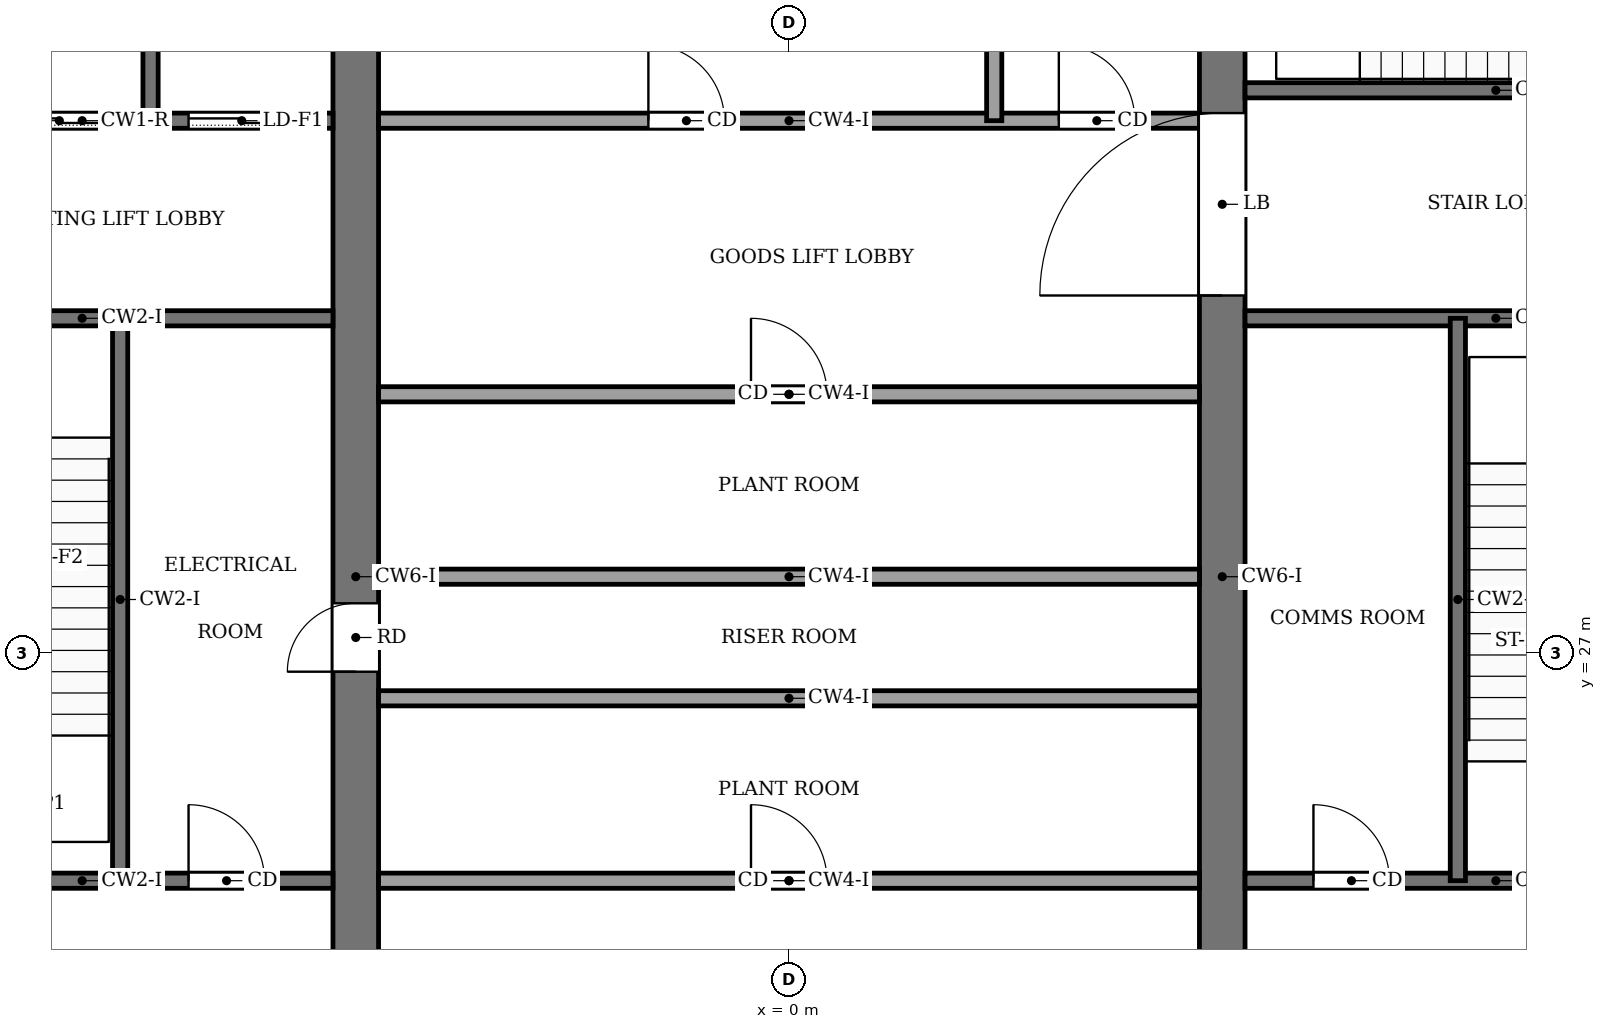
"""IFC4 building model, lengths in metres.
Left out: names, types, materials, properties, quantities, classifications, styles, units other than length and angle.
Written with IfcOpenShell. Run it as: python <this file> out.ifc"""

import sys

from ifc_helpers import new_model, si_unit, direction, frame, frame_2d, origin, place, context, subcontext, project, spatial, rectangle, extrude, element, fill, save


model = new_model("IFC4")
c1 = context("Model", 3, precision=1e-05, world=origin(), true_north=direction((0.0, 1.0)))
c2 = subcontext(c1, "Body", "Model", "MODEL_VIEW")
j1 = project(units=[si_unit("LENGTHUNIT", "METRE"), si_unit("PLANEANGLEUNIT", "RADIAN")], contexts=[c1])
p1 = place(None, origin())
s1 = spatial("IfcSite", under=j1, at=p1, CompositionType="ELEMENT")
p2 = place(p1, origin())
s2 = spatial("IfcBuilding", under=s1, at=p2, CompositionType="ELEMENT")
p3 = place(p2, frame((0.0, 0.0, 349.5)))
s3 = spatial("IfcBuildingStorey", under=s2, at=p3, CompositionType="ELEMENT", Elevation=349.5)
p4 = place(p3, frame((-5.7, 18.4, -0.15), z_axis=(0.0, 0.0, 1.0), x_axis=(0.0, 1.0, 0.0)))
e1 = element("IfcWall", 1, at=p4, inside=s3, PredefinedType="SHEAR", context=c2, shape_type="SweptSolid", body=[
    extrude(rectangle(XDim=19.2, YDim=0.6, at=frame_2d((9.6, 0.0))), origin(), (0.0, 0.0, 1.0), 5.0),
])
p5 = place(p4, frame((8.35, 0.0, 0.15)))
e2 = element("IfcOpeningElement", 2, at=p5, cuts=e1, PredefinedType="OPENING", context=c2, shape_type="SweptSolid", body=[
    extrude(rectangle(XDim=0.9, YDim=2.1, at=frame_2d((0.45, 1.05))), frame((0.0, 0.31, 0.0), z_axis=(0.0, -1.0, 0.0), x_axis=(1.0, 0.0, 0.0)), (0.0, 0.0, 1.0), 0.62),
])
p6 = place(p3, frame((5.7, 18.4, -0.15), z_axis=(0.0, 0.0, 1.0), x_axis=(0.0, 1.0, 0.0)))
e3 = element("IfcWall", 3, at=p6, inside=s3, PredefinedType="SHEAR", context=c2, shape_type="SweptSolid", body=[
    extrude(rectangle(XDim=19.2, YDim=0.6, at=frame_2d((9.6, 0.0))), origin(), (0.0, 0.0, 1.0), 5.0),
])
p7 = place(p6, frame((13.3, 0.0, 0.15)))
e4 = element("IfcOpeningElement", 4, at=p7, cuts=e3, PredefinedType="OPENING", context=c2, shape_type="SweptSolid", body=[
    extrude(rectangle(XDim=2.4, YDim=2.4, at=frame_2d((1.2, 1.2))), frame((0.0, 0.31, 0.0), z_axis=(0.0, -1.0, 0.0), x_axis=(1.0, 0.0, 0.0)), (0.0, 0.0, 1.0), 0.62),
])
p8 = place(p3, frame((-12.6, 24.0, 0.0), z_axis=(0.0, 0.0, 1.0), x_axis=(1.0, 0.0, 0.0)))
e5 = element("IfcWall", 5, at=p8, inside=s3, PredefinedType="PARTITIONING", context=c2, shape_type="SweptSolid", body=[
    extrude(rectangle(XDim=6.6, YDim=0.2, at=frame_2d((3.3, 0.0))), origin(), (0.0, 0.0, 1.0), 4.85),
])
p9 = place(p8, frame((4.7, 0.0, 0.0)))
e6 = element("IfcOpeningElement", 6, at=p9, cuts=e5, PredefinedType="OPENING", context=c2, shape_type="SweptSolid", body=[
    extrude(rectangle(XDim=1.0, YDim=2.1, at=frame_2d((0.5, 1.05))), frame((0.0, 0.11, 0.0), z_axis=(0.0, -1.0, 0.0), x_axis=(1.0, 0.0, 0.0)), (0.0, 0.0, 1.0), 0.22),
])
p10 = place(p3, frame((-5.4, 24.0, 0.0), z_axis=(0.0, 0.0, 1.0), x_axis=(1.0, 0.0, 0.0)))
e7 = element("IfcWall", 7, at=p10, inside=s3, PredefinedType="PARTITIONING", context=c2, shape_type="SweptSolid", body=[
    extrude(rectangle(XDim=10.8, YDim=0.2, at=frame_2d((5.4, 0.0))), origin(), (0.0, 0.0, 1.0), 4.85),
])
p11 = place(p10, frame((4.9, 0.0, 0.0)))
e8 = element("IfcOpeningElement", 8, at=p11, cuts=e7, PredefinedType="OPENING", context=c2, shape_type="SweptSolid", body=[
    extrude(rectangle(XDim=1.0, YDim=2.1, at=frame_2d((0.5, 1.05))), frame((0.0, 0.11, 0.0), z_axis=(0.0, -1.0, 0.0), x_axis=(1.0, 0.0, 0.0)), (0.0, 0.0, 1.0), 0.22),
])
p12 = place(p3, frame((6.0, 24.0, 0.0), z_axis=(0.0, 0.0, 1.0), x_axis=(1.0, 0.0, 0.0)))
e9 = element("IfcWall", 9, at=p12, inside=s3, PredefinedType="PARTITIONING", context=c2, shape_type="SweptSolid", body=[
    extrude(rectangle(XDim=6.6, YDim=0.2, at=frame_2d((3.3, 0.0))), origin(), (0.0, 0.0, 1.0), 4.85),
])
p13 = place(p12, frame((0.9, 0.0, 0.0)))
e10 = element("IfcOpeningElement", 10, at=p13, cuts=e9, PredefinedType="OPENING", context=c2, shape_type="SweptSolid", body=[
    extrude(rectangle(XDim=1.0, YDim=2.1, at=frame_2d((0.5, 1.05))), frame((0.0, 0.11, 0.0), z_axis=(0.0, -1.0, 0.0), x_axis=(1.0, 0.0, 0.0)), (0.0, 0.0, 1.0), 0.22),
])
p14 = place(p12, frame((4.4, 0.0, 0.0)))
e11 = element("IfcOpeningElement", 11, at=p14, cuts=e9, PredefinedType="OPENING", context=c2, shape_type="SweptSolid", body=[
    extrude(rectangle(XDim=1.2, YDim=2.2, at=frame_2d((0.6, 1.1))), frame((0.0, 0.11, 0.0), z_axis=(0.0, -1.0, 0.0), x_axis=(1.0, 0.0, 0.0)), (0.0, 0.0, 1.0), 0.22),
])
for number, where, z_axis, x_axis in (
    (12, (-5.4, 26.4, 0.0), (0.0, 0.0, 1.0), (1.0, 0.0, 0.0)),
    (13, (-5.4, 28.0, 0.0), (0.0, 0.0, 1.0), (1.0, 0.0, 0.0)),
):
    element("IfcWall", number, at=place(p3, frame(where, z_axis=z_axis, x_axis=x_axis)), inside=s3, PredefinedType="PARTITIONING", context=c2, shape_type="SweptSolid", body=[
        extrude(rectangle(XDim=10.8, YDim=0.2, at=frame_2d((5.4, 0.0))), origin(), (0.0, 0.0, 1.0), 4.85),
    ])
p15 = place(p3, frame((-5.4, 30.4, 0.0), z_axis=(0.0, 0.0, 1.0), x_axis=(1.0, 0.0, 0.0)))
e14 = element("IfcWall", 14, at=p15, inside=s3, PredefinedType="PARTITIONING", context=c2, shape_type="SweptSolid", body=[
    extrude(rectangle(XDim=10.8, YDim=0.2, at=frame_2d((5.4, 0.0))), origin(), (0.0, 0.0, 1.0), 4.85),
])
p16 = place(p15, frame((4.9, 0.0, 0.0)))
e15 = element("IfcOpeningElement", 15, at=p16, cuts=e14, PredefinedType="OPENING", context=c2, shape_type="SweptSolid", body=[
    extrude(rectangle(XDim=1.0, YDim=2.1, at=frame_2d((0.5, 1.05))), frame((0.0, 0.11, 0.0), z_axis=(0.0, -1.0, 0.0), x_axis=(1.0, 0.0, 0.0)), (0.0, 0.0, 1.0), 0.22),
])
p17 = place(p3, frame((-12.6, 31.4, 0.0), z_axis=(0.0, 0.0, 1.0), x_axis=(1.0, 0.0, 0.0)))
e16 = element("IfcWall", 16, at=p17, inside=s3, PredefinedType="PARTITIONING", context=c2, shape_type="SweptSolid", body=[
    extrude(rectangle(XDim=6.6, YDim=0.2, at=frame_2d((3.3, 0.0))), origin(), (0.0, 0.0, 1.0), 4.85),
])
p18 = place(p17, frame((1.0, 0.0, 0.0)))
e17 = element("IfcOpeningElement", 17, at=p18, cuts=e16, PredefinedType="OPENING", context=c2, shape_type="SweptSolid", body=[
    extrude(rectangle(XDim=1.2, YDim=2.2, at=frame_2d((0.6, 1.1))), frame((0.0, 0.11, 0.0), z_axis=(0.0, -1.0, 0.0), x_axis=(1.0, 0.0, 0.0)), (0.0, 0.0, 1.0), 0.22),
])
p19 = place(p3, frame((6.0, 31.4, 0.0), z_axis=(0.0, 0.0, 1.0), x_axis=(1.0, 0.0, 0.0)))
e18 = element("IfcWall", 18, at=p19, inside=s3, PredefinedType="PARTITIONING", context=c2, shape_type="SweptSolid", body=[
    extrude(rectangle(XDim=6.6, YDim=0.2, at=frame_2d((3.3, 0.0))), origin(), (0.0, 0.0, 1.0), 4.85),
])
p20 = place(p3, frame((-12.6, 34.0, 0.0), z_axis=(0.0, 0.0, 1.0), x_axis=(1.0, 0.0, 0.0)))
e19 = element("IfcWall", 19, at=p20, inside=s3, PredefinedType="PARTITIONING", context=c2, shape_type="SweptSolid", body=[
    extrude(rectangle(XDim=6.6, YDim=0.2, at=frame_2d((3.3, 0.0))), origin(), (0.0, 0.0, 1.0), 4.85),
])
p21 = place(p20, frame((4.7, 0.0, 0.0)))
e20 = element("IfcOpeningElement", 20, at=p21, cuts=e19, PredefinedType="OPENING", context=c2, shape_type="SweptSolid", body=[
    extrude(rectangle(XDim=1.4, YDim=2.2, at=frame_2d((0.7, 1.1))), frame((0.0, 0.11, 0.0), z_axis=(0.0, -1.0, 0.0), x_axis=(1.0, 0.0, 0.0)), (0.0, 0.0, 1.0), 0.22),
])
p22 = place(p20, frame((2.3, 0.0, 0.0)))
e21 = element("IfcOpeningElement", 21, at=p22, cuts=e19, PredefinedType="OPENING", context=c2, shape_type="SweptSolid", body=[
    extrude(rectangle(XDim=1.4, YDim=2.2, at=frame_2d((0.7, 1.1))), frame((0.0, 0.11, 0.0), z_axis=(0.0, -1.0, 0.0), x_axis=(1.0, 0.0, 0.0)), (0.0, 0.0, 1.0), 0.22),
])
p23 = place(p20, frame((0.45, 0.0, 0.0)))
e22 = element("IfcOpeningElement", 22, at=p23, cuts=e19, PredefinedType="OPENING", context=c2, shape_type="SweptSolid", body=[
    extrude(rectangle(XDim=0.9, YDim=2.1, at=frame_2d((0.45, 1.05))), frame((0.0, 0.11, 0.0), z_axis=(0.0, -1.0, 0.0), x_axis=(1.0, 0.0, 0.0)), (0.0, 0.0, 1.0), 0.22),
])
p24 = place(p3, frame((-5.4, 34.0, 0.0), z_axis=(0.0, 0.0, 1.0), x_axis=(1.0, 0.0, 0.0)))
e23 = element("IfcWall", 23, at=p24, inside=s3, PredefinedType="PARTITIONING", context=c2, shape_type="SweptSolid", body=[
    extrude(rectangle(XDim=10.8, YDim=0.2, at=frame_2d((5.4, 0.0))), origin(), (0.0, 0.0, 1.0), 4.85),
])
p25 = place(p24, frame((3.55, 0.0, 0.0)))
e24 = element("IfcOpeningElement", 24, at=p25, cuts=e23, PredefinedType="OPENING", context=c2, shape_type="SweptSolid", body=[
    extrude(rectangle(XDim=1.0, YDim=2.1, at=frame_2d((0.5, 1.05))), frame((0.0, 0.11, 0.0), z_axis=(0.0, -1.0, 0.0), x_axis=(1.0, 0.0, 0.0)), (0.0, 0.0, 1.0), 0.22),
])
p26 = place(p24, frame((8.95, 0.0, 0.0)))
e25 = element("IfcOpeningElement", 25, at=p26, cuts=e23, PredefinedType="OPENING", context=c2, shape_type="SweptSolid", body=[
    extrude(rectangle(XDim=1.0, YDim=2.1, at=frame_2d((0.5, 1.05))), frame((0.0, 0.11, 0.0), z_axis=(0.0, -1.0, 0.0), x_axis=(1.0, 0.0, 0.0)), (0.0, 0.0, 1.0), 0.22),
])
p27 = place(p3, frame((6.0, 34.4, 0.0), z_axis=(0.0, 0.0, 1.0), x_axis=(1.0, 0.0, 0.0)))
e26 = element("IfcWall", 26, at=p27, inside=s3, PredefinedType="PARTITIONING", context=c2, shape_type="SweptSolid", body=[
    extrude(rectangle(XDim=6.6, YDim=0.2, at=frame_2d((3.3, 0.0))), origin(), (0.0, 0.0, 1.0), 4.85),
])
p28 = place(p27, frame((4.8, 0.0, 0.0)))
e27 = element("IfcOpeningElement", 27, at=p28, cuts=e26, PredefinedType="OPENING", context=c2, shape_type="SweptSolid", body=[
    extrude(rectangle(XDim=1.2, YDim=2.2, at=frame_2d((0.6, 1.1))), frame((0.0, 0.11, 0.0), z_axis=(0.0, -1.0, 0.0), x_axis=(1.0, 0.0, 0.0)), (0.0, 0.0, 1.0), 0.22),
])
p29 = place(p3, frame((-8.8, 24.0, 0.0), z_axis=(0.0, 0.0, 1.0), x_axis=(0.0, 1.0, 0.0)))
e28 = element("IfcWall", 28, at=p29, inside=s3, PredefinedType="PARTITIONING", context=c2, shape_type="SweptSolid", body=[
    extrude(rectangle(XDim=7.4, YDim=0.2, at=frame_2d((3.7, 0.0))), origin(), (0.0, 0.0, 1.0), 4.85),
])
for number, where, z_axis, x_axis in (
    (29, (-8.4, 34.0, 0.0), (0.0, 0.0, 1.0), (0.0, 1.0, 0.0)),
    (30, (2.7, 34.0, 0.0), (0.0, 0.0, 1.0), (0.0, 1.0, 0.0)),
):
    element("IfcWall", number, at=place(p3, frame(where, z_axis=z_axis, x_axis=x_axis)), inside=s3, PredefinedType="PARTITIONING", context=c2, shape_type="SweptSolid", body=[
        extrude(rectangle(XDim=3.6, YDim=0.2, at=frame_2d((1.8, 0.0))), origin(), (0.0, 0.0, 1.0), 4.85),
    ])
p30 = place(p3, frame((8.8, 24.0, 0.0), z_axis=(0.0, 0.0, 1.0), x_axis=(0.0, 1.0, 0.0)))
e31 = element("IfcWall", 31, at=p30, inside=s3, PredefinedType="PARTITIONING", context=c2, shape_type="SweptSolid", body=[
    extrude(rectangle(XDim=7.4, YDim=0.2, at=frame_2d((3.7, 0.0))), origin(), (0.0, 0.0, 1.0), 4.85),
])
p31 = place(p21, origin())
e32 = element("IfcDoor", 32, at=p31, inside=s3, OperationType="SLIDING_TO_LEFT", PredefinedType="DOOR", context=c2, shape_type="SweptSolid", body=[
    extrude(rectangle(XDim=1.4, YDim=2.2, at=frame_2d((0.7, 1.1))), frame((0.0, 0.025, 0.0), z_axis=(0.0, -1.0, 0.0), x_axis=(1.0, 0.0, 0.0)), (0.0, 0.0, 1.0), 0.05),
])
fill(e20, e32)
p32 = place(p22, origin())
e33 = element("IfcDoor", 33, at=p32, inside=s3, OperationType="SLIDING_TO_LEFT", PredefinedType="DOOR", context=c2, shape_type="SweptSolid", body=[
    extrude(rectangle(XDim=1.4, YDim=2.2, at=frame_2d((0.7, 1.1))), frame((0.0, 0.025, 0.0), z_axis=(0.0, -1.0, 0.0), x_axis=(1.0, 0.0, 0.0)), (0.0, 0.0, 1.0), 0.05),
])
fill(e21, e33)
p33 = place(p11, origin())
e34 = element("IfcDoor", 34, at=p33, inside=s3, OperationType="SINGLE_SWING_RIGHT", PredefinedType="DOOR", context=c2, shape_type="SweptSolid", body=[
    extrude(rectangle(XDim=1.0, YDim=2.1, at=frame_2d((0.5, 1.05))), frame((0.0, 0.025, 0.0), z_axis=(0.0, -1.0, 0.0), x_axis=(1.0, 0.0, 0.0)), (0.0, 0.0, 1.0), 0.05),
])
fill(e8, e34)
p34 = place(p16, origin())
e35 = element("IfcDoor", 35, at=p34, inside=s3, OperationType="SINGLE_SWING_LEFT", PredefinedType="DOOR", context=c2, shape_type="SweptSolid", body=[
    extrude(rectangle(XDim=1.0, YDim=2.1, at=frame_2d((0.5, 1.05))), frame((0.0, 0.025, 0.0), z_axis=(0.0, -1.0, 0.0), x_axis=(1.0, 0.0, 0.0)), (0.0, 0.0, 1.0), 0.05),
])
fill(e15, e35)
p35 = place(p25, origin())
e36 = element("IfcDoor", 36, at=p35, inside=s3, OperationType="SINGLE_SWING_LEFT", PredefinedType="DOOR", context=c2, shape_type="SweptSolid", body=[
    extrude(rectangle(XDim=1.0, YDim=2.1, at=frame_2d((0.5, 1.05))), frame((0.0, 0.025, 0.0), z_axis=(0.0, -1.0, 0.0), x_axis=(1.0, 0.0, 0.0)), (0.0, 0.0, 1.0), 0.05),
])
fill(e24, e36)
p36 = place(p9, origin())
e37 = element("IfcDoor", 37, at=p36, inside=s3, OperationType="SINGLE_SWING_LEFT", PredefinedType="DOOR", context=c2, shape_type="SweptSolid", body=[
    extrude(rectangle(XDim=1.0, YDim=2.1, at=frame_2d((0.5, 1.05))), frame((0.0, 0.025, 0.0), z_axis=(0.0, -1.0, 0.0), x_axis=(1.0, 0.0, 0.0)), (0.0, 0.0, 1.0), 0.05),
])
fill(e6, e37)
p37 = place(p13, origin())
e38 = element("IfcDoor", 38, at=p37, inside=s3, OperationType="SINGLE_SWING_RIGHT", PredefinedType="DOOR", context=c2, shape_type="SweptSolid", body=[
    extrude(rectangle(XDim=1.0, YDim=2.1, at=frame_2d((0.5, 1.05))), frame((0.0, 0.025, 0.0), z_axis=(0.0, -1.0, 0.0), x_axis=(1.0, 0.0, 0.0)), (0.0, 0.0, 1.0), 0.05),
])
fill(e10, e38)
p38 = place(p26, origin())
e39 = element("IfcDoor", 39, at=p38, inside=s3, OperationType="SINGLE_SWING_LEFT", PredefinedType="DOOR", context=c2, shape_type="SweptSolid", body=[
    extrude(rectangle(XDim=1.0, YDim=2.1, at=frame_2d((0.5, 1.05))), frame((0.0, 0.025, 0.0), z_axis=(0.0, -1.0, 0.0), x_axis=(1.0, 0.0, 0.0)), (0.0, 0.0, 1.0), 0.05),
])
fill(e25, e39)
p39 = place(p5, origin())
e40 = element("IfcDoor", 40, at=p39, inside=s3, OperationType="SINGLE_SWING_LEFT", PredefinedType="DOOR", context=c2, shape_type="SweptSolid", body=[
    extrude(rectangle(XDim=0.9, YDim=2.1, at=frame_2d((0.45, 1.05))), frame((0.0, 0.025, 0.0), z_axis=(0.0, -1.0, 0.0), x_axis=(1.0, 0.0, 0.0)), (0.0, 0.0, 1.0), 0.05),
])
fill(e2, e40)
p40 = place(p7, origin())
e41 = element("IfcDoor", 41, at=p40, inside=s3, OperationType="DOUBLE_DOOR_SINGLE_SWING", PredefinedType="DOOR", context=c2, shape_type="SweptSolid", body=[
    extrude(rectangle(XDim=2.4, YDim=2.4, at=frame_2d((1.2, 1.2))), frame((0.0, 0.025, 0.0), z_axis=(0.0, -1.0, 0.0), x_axis=(1.0, 0.0, 0.0)), (0.0, 0.0, 1.0), 0.05),
])
fill(e4, e41)
save(model, sys.argv[1])
